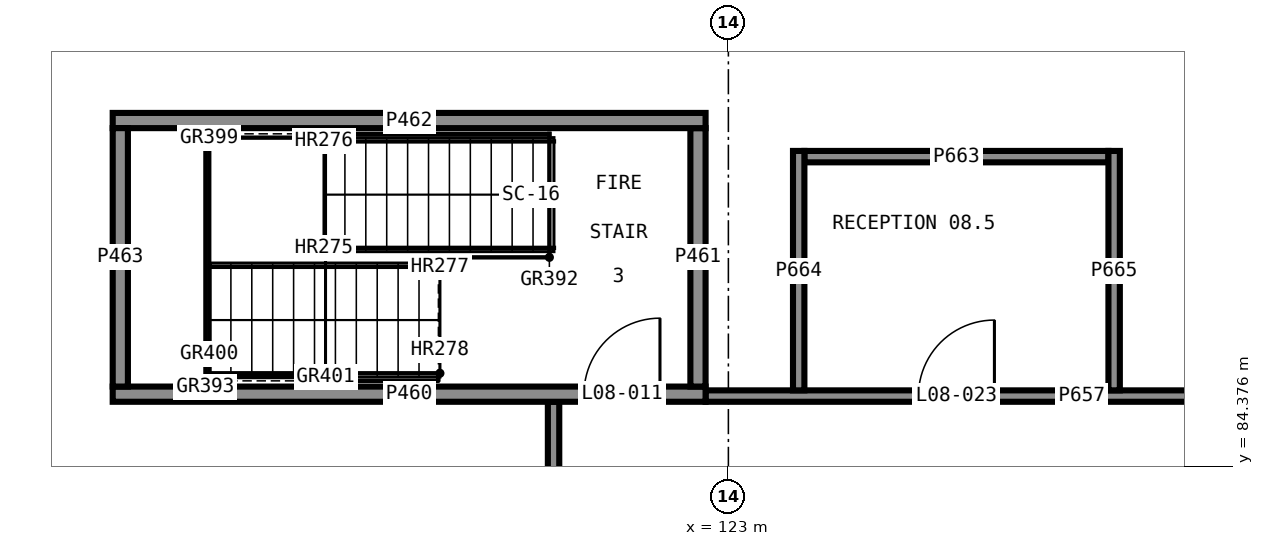
"""IFC4 building model, lengths in metres.
Left out: names, types, materials, properties, quantities, classifications, styles, units other than length and angle.
Written with IfcOpenShell. Run it as: python <this file> out.ifc"""

import sys

from ifc_helpers import new_model, si_unit, direction, frame, frame_2d, origin, place, context, subcontext, project, spatial, rectangle, extrude, element, fill, save


model = new_model("IFC4")
c1 = context("Model", 3, precision=1e-05, world=origin(), true_north=direction((0.0, 1.0)))
c2 = subcontext(c1, "Body", "Model", "MODEL_VIEW")
j1 = project(units=[si_unit("LENGTHUNIT", "METRE"), si_unit("PLANEANGLEUNIT", "RADIAN")], contexts=[c1])
p1 = place(None, origin())
s1 = spatial("IfcSite", under=j1, at=p1, CompositionType="ELEMENT")
p2 = place(p1, origin())
s2 = spatial("IfcBuilding", under=s1, at=p2, CompositionType="ELEMENT")
p3 = place(p2, frame((0.0, 0.0, 33.5)))
s3 = spatial("IfcBuildingStorey", under=s2, at=p3, CompositionType="ELEMENT", Elevation=33.5)
p4 = place(p3, frame((114.9, 85.325, 0.0), z_axis=(0.0, 0.0, 1.0), x_axis=(1.0, 0.0, 0.0)))
e1 = element("IfcWall", 1, at=p4, inside=s3, PredefinedType="SHEAR", context=c2, shape_type="SweptSolid", body=[
    extrude(rectangle(XDim=7.8, YDim=0.2, at=frame_2d((3.9, 0.0))), origin(), (0.0, 0.0, 1.0), 3.75),
])
p5 = place(p4, frame((6.2, 0.0, 0.0)))
e2 = element("IfcOpeningElement", 2, at=p5, cuts=e1, PredefinedType="OPENING", context=c2, shape_type="SweptSolid", body=[
    extrude(rectangle(XDim=1.0, YDim=2.1, at=frame_2d((0.5, 1.05))), frame((0.0, 0.11, 0.0), z_axis=(0.0, -1.0, 0.0), x_axis=(1.0, 0.0, 0.0)), (0.0, 0.0, 1.0), 0.22),
])
p6 = place(p3, frame((122.6, 85.425, 0.0), z_axis=(0.0, 0.0, 1.0), x_axis=(0.0, 1.0, 0.0)))
e3 = element("IfcWall", 3, at=p6, inside=s3, PredefinedType="SHEAR", context=c2, shape_type="SweptSolid", body=[
    extrude(rectangle(XDim=3.4, YDim=0.2, at=frame_2d((1.7, 0.0))), origin(), (0.0, 0.0, 1.0), 3.75),
])
p7 = place(p3, frame((122.7, 88.925, 0.0), z_axis=(0.0, 0.0, 1.0), x_axis=(-1.0, 0.0, 0.0)))
e4 = element("IfcWall", 4, at=p7, inside=s3, PredefinedType="SHEAR", context=c2, shape_type="SweptSolid", body=[
    extrude(rectangle(XDim=7.8, YDim=0.2, at=frame_2d((3.9, 0.0))), origin(), (0.0, 0.0, 1.0), 3.75),
])
p8 = place(p3, frame((115.0, 88.825, 0.0), z_axis=(0.0, 0.0, 1.0), x_axis=(0.0, -1.0, 0.0)))
e5 = element("IfcWall", 5, at=p8, inside=s3, PredefinedType="SHEAR", context=c2, shape_type="SweptSolid", body=[
    extrude(rectangle(XDim=3.4, YDim=0.2, at=frame_2d((1.7, 0.0))), origin(), (0.0, 0.0, 1.0), 3.75),
])
p9 = place(p3, frame((120.7, 62.7, 0.0), z_axis=(0.0, 0.0, 1.0), x_axis=(0.0, 1.0, 0.0)))
e6 = element("IfcWall", 6, at=p9, inside=s3, PredefinedType="PARTITIONING", context=c2, shape_type="SweptSolid", body=[
    extrude(rectangle(XDim=22.525, YDim=0.15, at=frame_2d((11.263, 0.0))), origin(), (0.0, 0.0, 1.0), 3.75),
])
p10 = place(p9, frame((16.435, 0.0, 0.0)))
e7 = element("IfcOpeningElement", 7, at=p10, cuts=e6, PredefinedType="OPENING", context=c2, shape_type="SweptSolid", body=[
    extrude(rectangle(XDim=1.0, YDim=2.1, at=frame_2d((0.5, 1.05))), frame((0.0, 0.085, 0.0), z_axis=(0.0, -1.0, 0.0), x_axis=(1.0, 0.0, 0.0)), (0.0, 0.0, 1.0), 0.17),
])
p11 = place(p3, frame((122.7, 85.3, 0.0), z_axis=(0.0, 0.0, 1.0), x_axis=(1.0, 0.0, 0.0)))
e8 = element("IfcWall", 8, at=p11, inside=s3, PredefinedType="PARTITIONING", context=c2, shape_type="SweptSolid", body=[
    extrude(rectangle(XDim=9.9, YDim=0.15, at=frame_2d((4.95, 0.0))), origin(), (0.0, 0.0, 1.0), 3.75),
])
p12 = place(p11, frame((2.8, 0.0, 0.0)))
e9 = element("IfcOpeningElement", 9, at=p12, cuts=e8, PredefinedType="OPENING", context=c2, shape_type="SweptSolid", body=[
    extrude(rectangle(XDim=1.0, YDim=2.1, at=frame_2d((0.5, 1.05))), frame((0.0, 0.085, 0.0), z_axis=(0.0, -1.0, 0.0), x_axis=(1.0, 0.0, 0.0)), (0.0, 0.0, 1.0), 0.17),
])
p13 = place(p3, frame((124.0, 88.45, 0.0), z_axis=(0.0, 0.0, 1.0), x_axis=(1.0, 0.0, 0.0)))
e10 = element("IfcWall", 10, at=p13, inside=s3, PredefinedType="PARTITIONING", context=c2, shape_type="SweptSolid", body=[
    extrude(rectangle(XDim=4.0, YDim=0.15, at=frame_2d((2.0, 0.0))), origin(), (0.0, 0.0, 1.0), 3.75),
])
for number, where, z_axis, x_axis in (
    (11, (123.925, 85.375, 0.0), (0.0, 0.0, 1.0), (0.0, 1.0, 0.0)),
    (12, (128.075, 85.375, 0.0), (0.0, 0.0, 1.0), (0.0, 1.0, 0.0)),
):
    element("IfcWall", number, at=place(p3, frame(where, z_axis=z_axis, x_axis=x_axis)), inside=s3, PredefinedType="PARTITIONING", context=c2, shape_type="SweptSolid", body=[
        extrude(rectangle(XDim=3.15, YDim=0.15, at=frame_2d((1.575, 0.0))), origin(), (0.0, 0.0, 1.0), 3.75),
    ])
p14 = place(p5, origin())
e13 = element("IfcDoor", 13, at=p14, inside=s3, OperationType="SINGLE_SWING_LEFT", PredefinedType="DOOR", context=c2, shape_type="SweptSolid", body=[
    extrude(rectangle(XDim=1.0, YDim=2.1, at=frame_2d((0.5, 1.05))), frame((0.0, 0.025, 0.0), z_axis=(0.0, -1.0, 0.0), x_axis=(1.0, 0.0, 0.0)), (0.0, 0.0, 1.0), 0.05),
])
fill(e2, e13)
p15 = place(p12, origin())
e14 = element("IfcDoor", 14, at=p15, inside=s3, OperationType="SINGLE_SWING_LEFT", PredefinedType="DOOR", context=c2, shape_type="SweptSolid", body=[
    extrude(rectangle(XDim=1.0, YDim=2.1, at=frame_2d((0.5, 1.05))), frame((0.0, 0.025, 0.0), z_axis=(0.0, -1.0, 0.0), x_axis=(1.0, 0.0, 0.0)), (0.0, 0.0, 1.0), 0.05),
])
fill(e9, e14)
save(model, sys.argv[1])
